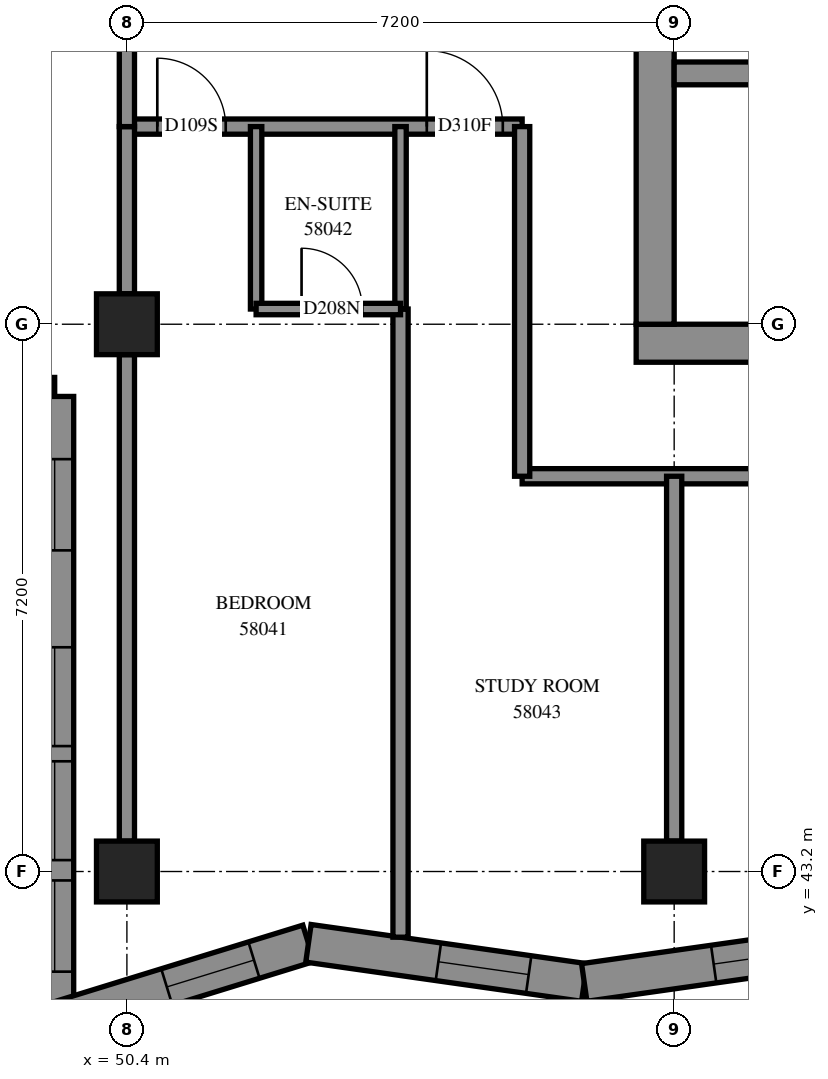
"""IFC4 building model, lengths in metres.
Left out: names, types, materials, properties, quantities, classifications, styles, units other than length and angle.
Written with IfcOpenShell. Run it as: python <this file> out.ifc"""

import sys

from ifc_helpers import new_model, si_unit, direction, frame, frame_2d, origin, origin_2d, place, context, subcontext, project, spatial, polyline, rectangle, outline, extrude, element, fill, save


model = new_model("IFC4")
c1 = context("Model", 3, precision=1e-05, world=origin(), true_north=direction((0.0, 1.0)))
c2 = subcontext(c1, "Body", "Model", "MODEL_VIEW")
j1 = project(units=[si_unit("LENGTHUNIT", "METRE"), si_unit("PLANEANGLEUNIT", "RADIAN")], contexts=[c1])
p1 = place(None, origin())
s1 = spatial("IfcSite", under=j1, at=p1, CompositionType="ELEMENT")
p2 = place(p1, origin())
s2 = spatial("IfcBuilding", under=s1, at=p2, CompositionType="ELEMENT")
p3 = place(p2, frame((0.0, 0.0, 213.4)))
s3 = spatial("IfcBuildingStorey", under=s2, at=p3, CompositionType="ELEMENT", Elevation=213.4)
for number, where, z_axis, x_axis in (
    (1, (50.4, 43.2, 0.0), (0.0, 0.0, 1.0), (1.0, 0.0, 0.0)),
    (2, (50.4, 50.4, 0.0), (0.0, 0.0, 1.0), (1.0, 0.0, 0.0)),
    (3, (57.6, 43.2, 0.0), (0.0, 0.0, 1.0), (1.0, 0.0, 0.0)),
):
    element("IfcColumn", number, at=place(p3, frame(where, z_axis=z_axis, x_axis=x_axis)), inside=s3, PredefinedType="COLUMN", context=c2, shape_type="SweptSolid", body=[
        extrude(rectangle(XDim=0.8, YDim=0.8, at=origin_2d()), origin(), (0.0, 0.0, 1.0), 3.1),
    ])
p4 = place(p3, frame((57.1, 50.15, -0.3), z_axis=(0.0, 0.0, 1.0), x_axis=(1.0, 0.0, 0.0)))
e4 = element("IfcWall", 4, at=p4, inside=s3, PredefinedType="SHEAR", context=c2, shape_type="SweptSolid", body=[
    extrude(rectangle(XDim=15.4, YDim=0.5, at=frame_2d((7.7, 0.0))), origin(), (0.0, 0.0, 1.0), 2.7),
])
p5 = place(p3, frame((57.35, 50.4, -0.3), z_axis=(0.0, 0.0, 1.0), x_axis=(0.0, 1.0, 0.0)))
e5 = element("IfcWall", 5, at=p5, inside=s3, PredefinedType="SHEAR", context=c2, shape_type="SweptSolid", body=[
    extrude(rectangle(XDim=14.4, YDim=0.5, at=frame_2d((7.2, 0.0))), origin(), (0.0, 0.0, 1.0), 2.7),
])
p6 = place(p5, frame((4.55, 0.0, 0.3)))
e6 = element("IfcOpeningElement", 6, at=p6, cuts=e5, PredefinedType="OPENING", context=c2, shape_type="SweptSolid", body=[
    extrude(rectangle(XDim=1.1, YDim=2.1, at=frame_2d((0.55, 1.05))), frame((0.0, 0.26, 0.0), z_axis=(0.0, -1.0, 0.0), x_axis=(1.0, 0.0, 0.0)), (0.0, 0.0, 1.0), 0.52),
])
p7 = place(p5, frame((11.35, 0.0, 0.3)))
e7 = element("IfcOpeningElement", 7, at=p7, cuts=e5, PredefinedType="OPENING", context=c2, shape_type="SweptSolid", body=[
    extrude(rectangle(XDim=1.1, YDim=2.1, at=frame_2d((0.55, 1.05))), frame((0.0, 0.26, 0.0), z_axis=(0.0, -1.0, 0.0), x_axis=(1.0, 0.0, 0.0)), (0.0, 0.0, 1.0), 0.52),
])
p8 = place(p3, frame((57.6, 53.7, 0.0), z_axis=(0.0, 0.0, 1.0), x_axis=(1.0, 0.0, 0.0)))
e8 = element("IfcWall", 8, at=p8, inside=s3, PredefinedType="SOLIDWALL", context=c2, shape_type="SweptSolid", body=[
    extrude(rectangle(XDim=14.4, YDim=0.3, at=frame_2d((7.2, 0.0))), origin(), (0.0, 0.0, 1.0), 3.1),
])
p9 = place(p8, frame((1.35, 0.0, 0.0)))
e9 = element("IfcOpeningElement", 9, at=p9, cuts=e8, PredefinedType="OPENING", context=c2, shape_type="SweptSolid", body=[
    extrude(rectangle(XDim=0.9, YDim=2.1, at=frame_2d((0.45, 1.05))), frame((0.0, 0.16, 0.0), z_axis=(0.0, -1.0, 0.0), x_axis=(1.0, 0.0, 0.0)), (0.0, 0.0, 1.0), 0.32),
])
p10 = place(p8, frame((4.95, 0.0, 0.0)))
e10 = element("IfcOpeningElement", 10, at=p10, cuts=e8, PredefinedType="OPENING", context=c2, shape_type="SweptSolid", body=[
    extrude(rectangle(XDim=0.9, YDim=2.1, at=frame_2d((0.45, 1.05))), frame((0.0, 0.16, 0.0), z_axis=(0.0, -1.0, 0.0), x_axis=(1.0, 0.0, 0.0)), (0.0, 0.0, 1.0), 0.32),
])
p11 = place(p8, frame((8.55, 0.0, 0.0)))
e11 = element("IfcOpeningElement", 11, at=p11, cuts=e8, PredefinedType="OPENING", context=c2, shape_type="SweptSolid", body=[
    extrude(rectangle(XDim=0.9, YDim=2.1, at=frame_2d((0.45, 1.05))), frame((0.0, 0.16, 0.0), z_axis=(0.0, -1.0, 0.0), x_axis=(1.0, 0.0, 0.0)), (0.0, 0.0, 1.0), 0.32),
])
p12 = place(p8, frame((12.05, 0.0, 0.0)))
e12 = element("IfcOpeningElement", 12, at=p12, cuts=e8, PredefinedType="OPENING", context=c2, shape_type="SweptSolid", body=[
    extrude(rectangle(XDim=1.1, YDim=2.1, at=frame_2d((0.55, 1.05))), frame((0.0, 0.16, 0.0), z_axis=(0.0, -1.0, 0.0), x_axis=(1.0, 0.0, 0.0)), (0.0, 0.0, 1.0), 0.32),
])
p13 = place(p3, frame((42.25, 49.45, 0.0), z_axis=(0.0, 0.0, 1.0), x_axis=(1.0, 0.0, 0.0)))
e13 = element("IfcWall", 13, at=p13, inside=s3, PredefinedType="SOLIDWALL", context=c2, shape_type="SweptSolid", body=[
    extrude(outline(polyline([(-0.25, -0.25), (6.95, -0.25), (7.45, 0.25), (0.25, 0.25), (-0.25, -0.25)])), origin(), (0.0, 0.0, 1.0), 3.1),
])
p14 = place(p13, frame((1.35, 0.0, 0.45)))
e14 = element("IfcOpeningElement", 14, at=p14, cuts=e13, PredefinedType="OPENING", context=c2, shape_type="SweptSolid", body=[
    extrude(rectangle(XDim=1.3, YDim=2.5, at=frame_2d((0.65, 1.25))), frame((0.0, 0.26, 0.0), z_axis=(0.0, -1.0, 0.0), x_axis=(1.0, 0.0, 0.0)), (0.0, 0.0, 1.0), 0.52),
])
p15 = place(p13, frame((2.85, 0.0, 0.45)))
e15 = element("IfcOpeningElement", 15, at=p15, cuts=e13, PredefinedType="OPENING", context=c2, shape_type="SweptSolid", body=[
    extrude(rectangle(XDim=1.3, YDim=2.5, at=frame_2d((0.65, 1.25))), frame((0.0, 0.26, 0.0), z_axis=(0.0, -1.0, 0.0), x_axis=(1.0, 0.0, 0.0)), (0.0, 0.0, 1.0), 0.52),
])
p16 = place(p13, frame((5.175, 0.0, 0.45)))
e16 = element("IfcOpeningElement", 16, at=p16, cuts=e13, PredefinedType="OPENING", context=c2, shape_type="SweptSolid", body=[
    extrude(rectangle(XDim=1.2, YDim=2.5, at=frame_2d((0.6, 1.25))), frame((0.0, 0.26, 0.0), z_axis=(0.0, -1.0, 0.0), x_axis=(1.0, 0.0, 0.0)), (0.0, 0.0, 1.0), 0.52),
])
p17 = place(p3, frame((49.45, 49.45, 0.0), z_axis=(0.0, 0.0, 1.0), x_axis=(0.0, -1.0, 0.0)))
e17 = element("IfcWall", 17, at=p17, inside=s3, PredefinedType="SOLIDWALL", context=c2, shape_type="SweptSolid", body=[
    extrude(outline(polyline([(0.25, -0.25), (8.562, -0.25), (7.885, 0.25), (-0.25, 0.25), (0.25, -0.25)])), origin(), (0.0, 0.0, 1.0), 3.1),
])
p18 = place(p17, frame((3.3, 0.0, 0.45)))
e18 = element("IfcOpeningElement", 18, at=p18, cuts=e17, PredefinedType="OPENING", context=c2, shape_type="SweptSolid", body=[
    extrude(rectangle(XDim=1.3, YDim=2.5, at=frame_2d((0.65, 1.25))), frame((0.0, 0.26, 0.0), z_axis=(0.0, -1.0, 0.0), x_axis=(1.0, 0.0, 0.0)), (0.0, 0.0, 1.0), 0.52),
])
p19 = place(p17, frame((4.8, 0.0, 0.45)))
e19 = element("IfcOpeningElement", 19, at=p19, cuts=e17, PredefinedType="OPENING", context=c2, shape_type="SweptSolid", body=[
    extrude(rectangle(XDim=1.3, YDim=2.5, at=frame_2d((0.65, 1.25))), frame((0.0, 0.26, 0.0), z_axis=(0.0, -1.0, 0.0), x_axis=(1.0, 0.0, 0.0)), (0.0, 0.0, 1.0), 0.52),
])
p20 = place(p17, frame((0.825, 0.0, 0.45)))
e20 = element("IfcOpeningElement", 20, at=p20, cuts=e17, PredefinedType="OPENING", context=c2, shape_type="SweptSolid", body=[
    extrude(rectangle(XDim=1.2, YDim=2.5, at=frame_2d((0.6, 1.25))), frame((0.0, 0.26, 0.0), z_axis=(0.0, -1.0, 0.0), x_axis=(1.0, 0.0, 0.0)), (0.0, 0.0, 1.0), 0.52),
])
p21 = place(p17, frame((6.367, 0.0, 0.45)))
e21 = element("IfcOpeningElement", 21, at=p21, cuts=e17, PredefinedType="OPENING", context=c2, shape_type="SweptSolid", body=[
    extrude(rectangle(XDim=1.2, YDim=2.5, at=frame_2d((0.6, 1.25))), frame((0.0, 0.26, 0.0), z_axis=(0.0, -1.0, 0.0), x_axis=(1.0, 0.0, 0.0)), (0.0, 0.0, 1.0), 0.52),
])
p22 = place(p3, frame((49.45, 41.227, 0.0), z_axis=(0.0, 0.0, 1.0), x_axis=(0.9556476946, 0.2945122812, 0.0)))
e22 = element("IfcWall", 22, at=p22, inside=s3, PredefinedType="SOLIDWALL", context=c2, shape_type="SweptSolid", body=[
    extrude(outline(polyline([(-0.339, -0.25), (3.437, -0.25), (3.549, 0.25), (0.339, 0.25), (-0.339, -0.25)])), origin(), (0.0, 0.0, 1.0), 3.1),
])
p23 = place(p22, frame((1.544, 0.0, 0.45)))
e23 = element("IfcOpeningElement", 23, at=p23, cuts=e22, PredefinedType="OPENING", context=c2, shape_type="SweptSolid", body=[
    extrude(rectangle(XDim=1.2, YDim=2.5, at=frame_2d((0.6, 1.25))), frame((0.0, 0.26, 0.0), z_axis=(0.0, -1.0, 0.0), x_axis=(1.0, 0.0, 0.0)), (0.0, 0.0, 1.0), 0.52),
])
p24 = place(p3, frame((52.788, 42.255, 0.0), z_axis=(0.0, 0.0, 1.0), x_axis=(0.9900822045, -0.140489246, 0.0)))
e24 = element("IfcWall", 24, at=p24, inside=s3, PredefinedType="SOLIDWALL", context=c2, shape_type="SweptSolid", body=[
    extrude(outline(polyline([(0.056, -0.25), (3.7, -0.25), (3.63, 0.25), (-0.056, 0.25), (0.056, -0.25)])), origin(), (0.0, 0.0, 1.0), 3.1),
])
p25 = place(p24, frame((1.727, 0.0, 0.45)))
e25 = element("IfcOpeningElement", 25, at=p25, cuts=e24, PredefinedType="OPENING", context=c2, shape_type="SweptSolid", body=[
    extrude(rectangle(XDim=1.2, YDim=2.5, at=frame_2d((0.6, 1.25))), frame((0.0, 0.26, 0.0), z_axis=(0.0, -1.0, 0.0), x_axis=(1.0, 0.0, 0.0)), (0.0, 0.0, 1.0), 0.52),
])
p26 = place(p3, frame((56.417, 41.74, 0.0), z_axis=(0.0, 0.0, 1.0), x_axis=(0.9900834903, 0.1404801848, 0.0)))
e26 = element("IfcWall", 26, at=p26, inside=s3, PredefinedType="SOLIDWALL", context=c2, shape_type="SweptSolid", body=[
    extrude(outline(polyline([(-0.035, -0.25), (3.609, -0.25), (3.68, 0.25), (0.035, 0.25), (-0.035, -0.25)])), origin(), (0.0, 0.0, 1.0), 3.1),
])
p27 = place(p26, frame((1.72, 0.0, 0.45)))
e27 = element("IfcOpeningElement", 27, at=p27, cuts=e26, PredefinedType="OPENING", context=c2, shape_type="SweptSolid", body=[
    extrude(rectangle(XDim=1.2, YDim=2.5, at=frame_2d((0.6, 1.25))), frame((0.0, 0.26, 0.0), z_axis=(0.0, -1.0, 0.0), x_axis=(1.0, 0.0, 0.0)), (0.0, 0.0, 1.0), 0.52),
])
p28 = place(p3, frame((55.6, 48.4, 0.0), z_axis=(0.0, 0.0, 1.0), x_axis=(1.0, 0.0, 0.0)))
e28 = element("IfcWall", 28, at=p28, inside=s3, PredefinedType="PARTITIONING", context=c2, shape_type="SweptSolid", body=[
    extrude(rectangle(XDim=18.4, YDim=0.2, at=frame_2d((9.2, 0.0))), origin(), (0.0, 0.0, 1.0), 3.1),
])
p29 = place(p28, frame((5.862, 0.0, 0.0)))
e29 = element("IfcOpeningElement", 29, at=p29, cuts=e28, PredefinedType="OPENING", context=c2, shape_type="SweptSolid", body=[
    extrude(rectangle(XDim=1.0, YDim=2.1, at=frame_2d((0.5, 1.05))), frame((0.0, 0.11, 0.0), z_axis=(0.0, -1.0, 0.0), x_axis=(1.0, 0.0, 0.0)), (0.0, 0.0, 1.0), 0.22),
])
p30 = place(p28, frame((13.099, 0.0, 0.0)))
e30 = element("IfcOpeningElement", 30, at=p30, cuts=e28, PredefinedType="OPENING", context=c2, shape_type="SweptSolid", body=[
    extrude(rectangle(XDim=0.9, YDim=2.1, at=frame_2d((0.45, 1.05))), frame((0.0, 0.11, 0.0), z_axis=(0.0, -1.0, 0.0), x_axis=(1.0, 0.0, 0.0)), (0.0, 0.0, 1.0), 0.22),
])
p31 = place(p3, frame((54.0, 42.336, 0.0), z_axis=(0.0, 0.0, 1.0), x_axis=(0.0, 1.0, 0.0)))
e31 = element("IfcWall", 31, at=p31, inside=s3, PredefinedType="PARTITIONING", context=c2, shape_type="SweptSolid", body=[
    extrude(rectangle(XDim=8.264, YDim=0.2, at=frame_2d((4.132, 0.0))), origin(), (0.0, 0.0, 1.0), 3.1),
])
p32 = place(p3, frame((50.4, 43.6, 0.0), z_axis=(0.0, 0.0, 1.0), x_axis=(0.0, 1.0, 0.0)))
e32 = element("IfcWall", 32, at=p32, inside=s3, PredefinedType="PARTITIONING", context=c2, shape_type="SweptSolid", body=[
    extrude(rectangle(XDim=6.4, YDim=0.2, at=frame_2d((3.2, 0.0))), origin(), (0.0, 0.0, 1.0), 2.6),
])
p33 = place(p3, frame((50.4, 53.0, 0.0), z_axis=(0.0, 0.0, 1.0), x_axis=(1.0, 0.0, 0.0)))
e33 = element("IfcWall", 33, at=p33, inside=s3, PredefinedType="PARTITIONING", context=c2, shape_type="SweptSolid", body=[
    extrude(rectangle(XDim=5.2, YDim=0.2, at=frame_2d((2.6, 0.0))), origin(), (0.0, 0.0, 1.0), 3.1),
])
p34 = place(p33, frame((0.4, 0.0, 0.0)))
e34 = element("IfcOpeningElement", 34, at=p34, cuts=e33, PredefinedType="OPENING", context=c2, shape_type="SweptSolid", body=[
    extrude(rectangle(XDim=0.9, YDim=2.1, at=frame_2d((0.45, 1.05))), frame((0.0, 0.11, 0.0), z_axis=(0.0, -1.0, 0.0), x_axis=(1.0, 0.0, 0.0)), (0.0, 0.0, 1.0), 0.22),
])
p35 = place(p33, frame((3.946, 0.0, 0.0)))
e35 = element("IfcOpeningElement", 35, at=p35, cuts=e33, PredefinedType="OPENING", context=c2, shape_type="SweptSolid", body=[
    extrude(rectangle(XDim=1.0, YDim=2.1, at=frame_2d((0.5, 1.05))), frame((0.0, 0.11, 0.0), z_axis=(0.0, -1.0, 0.0), x_axis=(1.0, 0.0, 0.0)), (0.0, 0.0, 1.0), 0.22),
])
p36 = place(p3, frame((57.6, 43.6, 0.0), z_axis=(0.0, 0.0, 1.0), x_axis=(0.0, 1.0, 0.0)))
e36 = element("IfcWall", 36, at=p36, inside=s3, PredefinedType="PARTITIONING", context=c2, shape_type="SweptSolid", body=[
    extrude(rectangle(XDim=4.8, YDim=0.2, at=frame_2d((2.4, 0.0))), origin(), (0.0, 0.0, 1.0), 3.1),
])
p37 = place(p3, frame((55.6, 48.4, 0.0), z_axis=(0.0, 0.0, 1.0), x_axis=(0.0, 1.0, 0.0)))
e37 = element("IfcWall", 37, at=p37, inside=s3, PredefinedType="PARTITIONING", context=c2, shape_type="SweptSolid", body=[
    extrude(rectangle(XDim=4.6, YDim=0.2, at=frame_2d((2.3, 0.0))), origin(), (0.0, 0.0, 1.0), 3.1),
])
for number, where, z_axis, x_axis in (
    (38, (52.1, 50.6, 0.0), (0.0, 0.0, 1.0), (0.0, 1.0, 0.0)),
    (39, (54.0, 50.6, 0.0), (0.0, 0.0, 1.0), (0.0, 1.0, 0.0)),
):
    element("IfcWall", number, at=place(p3, frame(where, z_axis=z_axis, x_axis=x_axis)), inside=s3, PredefinedType="PARTITIONING", context=c2, shape_type="SweptSolid", body=[
        extrude(rectangle(XDim=2.4, YDim=0.15, at=frame_2d((1.2, 0.0))), origin(), (0.0, 0.0, 1.0), 3.1),
    ])
p38 = place(p3, frame((50.4, 50.8, 0.0), z_axis=(0.0, 0.0, 1.0), x_axis=(0.0, 1.0, 0.0)))
e40 = element("IfcWall", 40, at=p38, inside=s3, PredefinedType="PARTITIONING", context=c2, shape_type="SweptSolid", body=[
    extrude(rectangle(XDim=2.2, YDim=0.2, at=frame_2d((1.1, 0.0))), origin(), (0.0, 0.0, 1.0), 3.1),
])
p39 = place(p3, frame((50.4, 53.0, 0.0), z_axis=(0.0, 0.0, 1.0), x_axis=(0.0, 1.0, 0.0)))
e41 = element("IfcWall", 41, at=p39, inside=s3, PredefinedType="PARTITIONING", context=c2, shape_type="SweptSolid", body=[
    extrude(rectangle(XDim=2.0, YDim=0.2, at=frame_2d((1.0, 0.0))), origin(), (0.0, 0.0, 1.0), 3.1),
])
p40 = place(p3, frame((52.1, 50.6, 0.0), z_axis=(0.0, 0.0, 1.0), x_axis=(1.0, 0.0, 0.0)))
e42 = element("IfcWall", 42, at=p40, inside=s3, PredefinedType="PARTITIONING", context=c2, shape_type="SweptSolid", body=[
    extrude(rectangle(XDim=1.9, YDim=0.15, at=frame_2d((0.95, 0.0))), origin(), (0.0, 0.0, 1.0), 3.1),
])
p41 = place(p40, frame((0.598, 0.0, 0.0)))
e43 = element("IfcOpeningElement", 43, at=p41, cuts=e42, PredefinedType="OPENING", context=c2, shape_type="SweptSolid", body=[
    extrude(rectangle(XDim=0.8, YDim=2.1, at=frame_2d((0.4, 1.05))), frame((0.0, 0.085, 0.0), z_axis=(0.0, -1.0, 0.0), x_axis=(1.0, 0.0, 0.0)), (0.0, 0.0, 1.0), 0.17),
])
p42 = place(p18, origin())
e44 = element("IfcWindow", 44, at=p42, inside=s3, PartitioningType="SINGLE_PANEL", PredefinedType="WINDOW", context=c2, shape_type="SweptSolid", body=[
    extrude(rectangle(XDim=1.3, YDim=2.5, at=frame_2d((0.65, 1.25))), frame((0.0, 0.18, 0.0), z_axis=(0.0, -1.0, 0.0), x_axis=(1.0, 0.0, 0.0)), (0.0, 0.0, 1.0), 0.06),
])
fill(e18, e44)
p43 = place(p19, origin())
e45 = element("IfcWindow", 45, at=p43, inside=s3, PartitioningType="SINGLE_PANEL", PredefinedType="WINDOW", context=c2, shape_type="SweptSolid", body=[
    extrude(rectangle(XDim=1.3, YDim=2.5, at=frame_2d((0.65, 1.25))), frame((0.0, 0.18, 0.0), z_axis=(0.0, -1.0, 0.0), x_axis=(1.0, 0.0, 0.0)), (0.0, 0.0, 1.0), 0.06),
])
fill(e19, e45)
p44 = place(p20, origin())
e46 = element("IfcWindow", 46, at=p44, inside=s3, PartitioningType="SINGLE_PANEL", PredefinedType="WINDOW", context=c2, shape_type="SweptSolid", body=[
    extrude(rectangle(XDim=1.2, YDim=2.5, at=frame_2d((0.6, 1.25))), frame((0.0, 0.18, 0.0), z_axis=(0.0, -1.0, 0.0), x_axis=(1.0, 0.0, 0.0)), (0.0, 0.0, 1.0), 0.06),
])
fill(e20, e46)
p45 = place(p21, origin())
e47 = element("IfcWindow", 47, at=p45, inside=s3, PartitioningType="SINGLE_PANEL", PredefinedType="WINDOW", context=c2, shape_type="SweptSolid", body=[
    extrude(rectangle(XDim=1.2, YDim=2.5, at=frame_2d((0.6, 1.25))), frame((0.0, 0.18, 0.0), z_axis=(0.0, -1.0, 0.0), x_axis=(1.0, 0.0, 0.0)), (0.0, 0.0, 1.0), 0.06),
])
fill(e21, e47)
p46 = place(p23, origin())
e48 = element("IfcWindow", 48, at=p46, inside=s3, PartitioningType="SINGLE_PANEL", PredefinedType="WINDOW", context=c2, shape_type="SweptSolid", body=[
    extrude(rectangle(XDim=1.2, YDim=2.5, at=frame_2d((0.6, 1.25))), frame((0.0, 0.18, 0.0), z_axis=(0.0, -1.0, 0.0), x_axis=(1.0, 0.0, 0.0)), (0.0, 0.0, 1.0), 0.06),
])
fill(e23, e48)
p47 = place(p25, origin())
e49 = element("IfcWindow", 49, at=p47, inside=s3, PartitioningType="SINGLE_PANEL", PredefinedType="WINDOW", context=c2, shape_type="SweptSolid", body=[
    extrude(rectangle(XDim=1.2, YDim=2.5, at=frame_2d((0.6, 1.25))), frame((0.0, 0.18, 0.0), z_axis=(0.0, -1.0, 0.0), x_axis=(1.0, 0.0, 0.0)), (0.0, 0.0, 1.0), 0.06),
])
fill(e25, e49)
p48 = place(p27, origin())
e50 = element("IfcWindow", 50, at=p48, inside=s3, PartitioningType="SINGLE_PANEL", PredefinedType="WINDOW", context=c2, shape_type="SweptSolid", body=[
    extrude(rectangle(XDim=1.2, YDim=2.5, at=frame_2d((0.6, 1.25))), frame((0.0, 0.18, 0.0), z_axis=(0.0, -1.0, 0.0), x_axis=(1.0, 0.0, 0.0)), (0.0, 0.0, 1.0), 0.06),
])
fill(e27, e50)
p49 = place(p34, origin())
e51 = element("IfcDoor", 51, at=p49, inside=s3, OperationType="SINGLE_SWING_LEFT", PredefinedType="DOOR", context=c2, shape_type="SweptSolid", body=[
    extrude(rectangle(XDim=0.9, YDim=2.1, at=frame_2d((0.45, 1.05))), frame((0.0, 0.025, 0.0), z_axis=(0.0, -1.0, 0.0), x_axis=(1.0, 0.0, 0.0)), (0.0, 0.0, 1.0), 0.05),
])
fill(e34, e51)
p50 = place(p41, origin())
e52 = element("IfcDoor", 52, at=p50, inside=s3, OperationType="SINGLE_SWING_RIGHT", PredefinedType="DOOR", context=c2, shape_type="SweptSolid", body=[
    extrude(rectangle(XDim=0.8, YDim=2.1, at=frame_2d((0.4, 1.05))), frame((0.0, 0.025, 0.0), z_axis=(0.0, -1.0, 0.0), x_axis=(1.0, 0.0, 0.0)), (0.0, 0.0, 1.0), 0.05),
])
fill(e43, e52)
p51 = place(p35, origin())
e53 = element("IfcDoor", 53, at=p51, inside=s3, OperationType="SINGLE_SWING_RIGHT", PredefinedType="DOOR", context=c2, shape_type="SweptSolid", body=[
    extrude(rectangle(XDim=1.0, YDim=2.1, at=frame_2d((0.5, 1.05))), frame((0.0, 0.025, 0.0), z_axis=(0.0, -1.0, 0.0), x_axis=(1.0, 0.0, 0.0)), (0.0, 0.0, 1.0), 0.05),
])
fill(e35, e53)
save(model, sys.argv[1])
